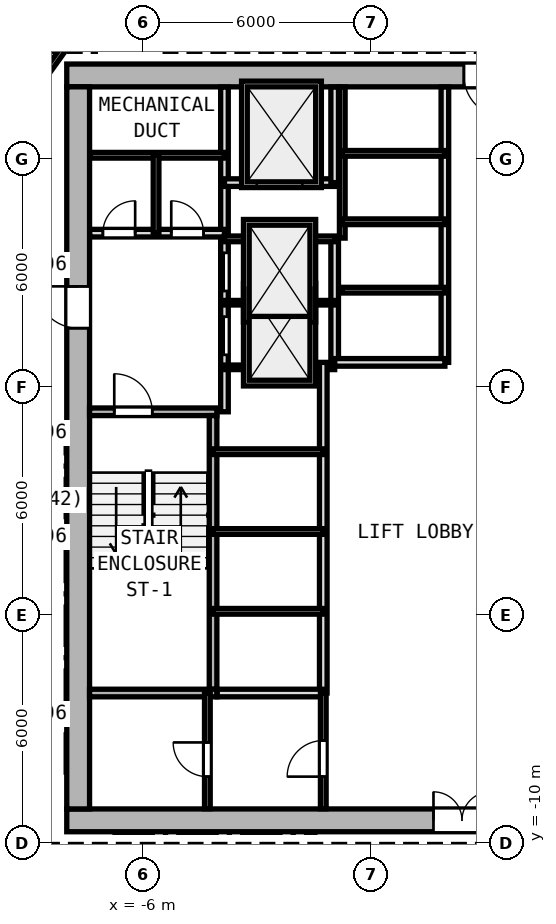
"""IFC4 building model, lengths in metres.
Left out: names, types, materials, properties, quantities, classifications, styles, units other than length and angle.
Written with IfcOpenShell. Run it as: python <this file> out.ifc"""

import sys

from ifc_helpers import new_model, si_unit, direction, frame, frame_2d, origin, origin_2d, place, context, subcontext, project, spatial, rectangle, i_section, extrude, element, fill, save


model = new_model("IFC4")
c1 = context("Model", 3, precision=1e-05, world=origin(), true_north=direction((0.0, 1.0)))
c2 = subcontext(c1, "Body", "Model", "MODEL_VIEW")
j1 = project(units=[si_unit("LENGTHUNIT", "METRE"), si_unit("PLANEANGLEUNIT", "RADIAN")], contexts=[c1])
p1 = place(None, origin())
s1 = spatial("IfcSite", under=j1, at=p1, CompositionType="ELEMENT")
p2 = place(p1, origin())
s2 = spatial("IfcBuilding", under=s1, at=p2, CompositionType="ELEMENT")
p3 = place(p2, frame((0.0, 0.0, 26.4)))
s3 = spatial("IfcBuildingStorey", under=s2, at=p3, CompositionType="ELEMENT", Elevation=26.4)
for number, where, z_axis, x_axis in (
    (1, (-7.7, -9.4, 0.0), (0.0, 0.0, 1.0), (1.0, 0.0, 0.0)),
    (2, (-7.7, 10.2, 0.0), (0.0, 0.0, 1.0), (1.0, 0.0, 0.0)),
    (3, (0.0, -9.4, 0.0), (0.0, 0.0, 1.0), (1.0, 0.0, 0.0)),
    (4, (-7.7, 2.0, 0.0), (0.0, 0.0, 1.0), (1.0, 0.0, 0.0)),
):
    element("IfcColumn", number, at=place(p3, frame(where, z_axis=z_axis, x_axis=x_axis)), inside=s3, PredefinedType="COLUMN", context=c2, shape_type="SweptSolid", body=[
        extrude(i_section(OverallWidth=0.416, OverallDepth=0.446, WebThickness=0.025, FlangeThickness=0.04, FilletRadius=0.015, at=origin_2d()), origin(), (0.0, 0.0, 1.0), 3.6),
    ])
p4 = place(p3, frame((-8.0, -9.4, 0.0), z_axis=(0.0, 0.0, 1.0), x_axis=(1.0, 0.0, 0.0)))
e5 = element("IfcWall", 5, at=p4, inside=s3, PredefinedType="SHEAR", context=c2, shape_type="SweptSolid", body=[
    extrude(rectangle(XDim=16.0, YDim=0.6, at=frame_2d((8.0, 0.0))), origin(), (0.0, 0.0, 1.0), 3.35),
])
p5 = place(p4, frame((9.65, 0.0, 0.0)))
e6 = element("IfcOpeningElement", 6, at=p5, cuts=e5, PredefinedType="OPENING", context=c2, shape_type="SweptSolid", body=[
    extrude(rectangle(XDim=1.5, YDim=2.2, at=frame_2d((0.75, 1.1))), frame((0.0, 0.31, 0.0), z_axis=(0.0, -1.0, 0.0), x_axis=(1.0, 0.0, 0.0)), (0.0, 0.0, 1.0), 0.62),
])
p6 = place(p3, frame((8.0, 10.2, 0.0), z_axis=(0.0, 0.0, 1.0), x_axis=(-1.0, 0.0, 0.0)))
e7 = element("IfcWall", 7, at=p6, inside=s3, PredefinedType="SHEAR", context=c2, shape_type="SweptSolid", body=[
    extrude(rectangle(XDim=16.0, YDim=0.6, at=frame_2d((8.0, 0.0))), origin(), (0.0, 0.0, 1.0), 3.35),
])
p7 = place(p6, frame((4.45, 0.0, 0.0)))
e8 = element("IfcOpeningElement", 8, at=p7, cuts=e7, PredefinedType="OPENING", context=c2, shape_type="SweptSolid", body=[
    extrude(rectangle(XDim=1.1, YDim=2.15, at=frame_2d((0.55, 1.075))), frame((0.0, 0.31, 0.0), z_axis=(0.0, -1.0, 0.0), x_axis=(1.0, 0.0, 0.0)), (0.0, 0.0, 1.0), 0.62),
])
p8 = place(p3, frame((-7.7, -9.1, 0.0), z_axis=(0.0, 0.0, 1.0), x_axis=(0.0, 1.0, 0.0)))
e9 = element("IfcWall", 9, at=p8, inside=s3, PredefinedType="SHEAR", context=c2, shape_type="SweptSolid", body=[
    extrude(rectangle(XDim=19.0, YDim=0.6, at=frame_2d((9.5, 0.0))), origin(), (0.0, 0.0, 1.0), 3.35),
])
p9 = place(p8, frame((12.65, 0.0, 0.0)))
e10 = element("IfcOpeningElement", 10, at=p9, cuts=e9, PredefinedType="OPENING", context=c2, shape_type="SweptSolid", body=[
    extrude(rectangle(XDim=1.1, YDim=2.15, at=frame_2d((0.55, 1.075))), frame((0.0, 0.31, 0.0), z_axis=(0.0, -1.0, 0.0), x_axis=(1.0, 0.0, 0.0)), (0.0, 0.0, 1.0), 0.62),
])
p10 = place(p3, frame((-7.4, 1.35, 0.0), z_axis=(0.0, 0.0, 1.0), x_axis=(1.0, 0.0, 0.0)))
e11 = element("IfcWall", 11, at=p10, inside=s3, PredefinedType="SOLIDWALL", context=c2, shape_type="SweptSolid", body=[
    extrude(rectangle(XDim=3.35, YDim=0.2, at=frame_2d((1.675, 0.0))), origin(), (0.0, 0.0, 1.0), 3.35),
])
p11 = place(p10, frame((0.65, 0.0, 0.0)))
e12 = element("IfcOpeningElement", 12, at=p11, cuts=e11, PredefinedType="OPENING", context=c2, shape_type="SweptSolid", body=[
    extrude(rectangle(XDim=1.0, YDim=2.15, at=frame_2d((0.5, 1.075))), frame((0.0, 0.11, 0.0), z_axis=(0.0, -1.0, 0.0), x_axis=(1.0, 0.0, 0.0)), (0.0, 0.0, 1.0), 0.22),
])
p12 = place(p3, frame((-4.15, -5.95, 0.0), z_axis=(0.0, 0.0, 1.0), x_axis=(0.0, 1.0, 0.0)))
e13 = element("IfcWall", 13, at=p12, inside=s3, PredefinedType="SOLIDWALL", context=c2, shape_type="SweptSolid", body=[
    extrude(rectangle(XDim=7.2, YDim=0.2, at=frame_2d((3.6, 0.0))), origin(), (0.0, 0.0, 1.0), 3.35),
])
p13 = place(p3, frame((-3.85, 1.35, 0.0), z_axis=(0.0, 0.0, 1.0), x_axis=(0.0, 1.0, 0.0)))
e14 = element("IfcWall", 14, at=p13, inside=s3, PredefinedType="SOLIDWALL", context=c2, shape_type="SweptSolid", body=[
    extrude(rectangle(XDim=8.545, YDim=0.2, at=frame_2d((4.272, 0.0))), origin(), (0.0, 0.0, 1.0), 3.35),
])
p14 = place(p13, frame((1.5, 0.0, 0.0)))
e15 = element("IfcOpeningElement", 15, at=p14, cuts=e14, PredefinedType="OPENING", context=c2, shape_type="SweptSolid", body=[
    extrude(rectangle(XDim=1.0, YDim=2.15, at=frame_2d((0.5, 1.075))), frame((0.0, 0.11, 0.0), z_axis=(0.0, -1.0, 0.0), x_axis=(1.0, 0.0, 0.0)), (0.0, 0.0, 1.0), 0.22),
])
p15 = place(p13, frame((3.18, 0.0, 0.0)))
e16 = element("IfcOpeningElement", 16, at=p15, cuts=e14, PredefinedType="OPENING", context=c2, shape_type="SweptSolid", body=[
    extrude(rectangle(XDim=1.0, YDim=2.15, at=frame_2d((0.5, 1.075))), frame((0.0, 0.11, 0.0), z_axis=(0.0, -1.0, 0.0), x_axis=(1.0, 0.0, 0.0)), (0.0, 0.0, 1.0), 0.22),
])
p16 = place(p3, frame((-7.395, 6.05, 0.0), z_axis=(0.0, 0.0, 1.0), x_axis=(1.0, 0.0, 0.0)))
e17 = element("IfcWall", 17, at=p16, inside=s3, PredefinedType="SOLIDWALL", context=c2, shape_type="SweptSolid", body=[
    extrude(rectangle(XDim=3.545, YDim=0.2, at=frame_2d((1.772, 0.0))), origin(), (0.0, 0.0, 1.0), 3.35),
])
p17 = place(p16, frame((0.345, 0.0, 0.0)))
e18 = element("IfcOpeningElement", 18, at=p17, cuts=e17, PredefinedType="OPENING", context=c2, shape_type="SweptSolid", body=[
    extrude(rectangle(XDim=0.85, YDim=2.1, at=frame_2d((0.425, 1.05))), frame((0.0, 0.11, 0.0), z_axis=(0.0, -1.0, 0.0), x_axis=(1.0, 0.0, 0.0)), (0.0, 0.0, 1.0), 0.22),
])
p18 = place(p16, frame((2.145, 0.0, 0.0)))
e19 = element("IfcOpeningElement", 19, at=p18, cuts=e17, PredefinedType="OPENING", context=c2, shape_type="SweptSolid", body=[
    extrude(rectangle(XDim=0.85, YDim=2.1, at=frame_2d((0.425, 1.05))), frame((0.0, 0.11, 0.0), z_axis=(0.0, -1.0, 0.0), x_axis=(1.0, 0.0, 0.0)), (0.0, 0.0, 1.0), 0.22),
])
p19 = place(p3, frame((-7.395, 8.1, 0.0), z_axis=(0.0, 0.0, 1.0), x_axis=(1.0, 0.0, 0.0)))
e20 = element("IfcWall", 20, at=p19, inside=s3, PredefinedType="PARTITIONING", context=c2, shape_type="SweptSolid", body=[
    extrude(rectangle(XDim=3.545, YDim=0.15, at=frame_2d((1.772, 0.0))), origin(), (0.0, 0.0, 1.0), 3.35),
])
p20 = place(p3, frame((-5.65, 6.05, 0.0), z_axis=(0.0, 0.0, 1.0), x_axis=(0.0, 1.0, 0.0)))
e21 = element("IfcWall", 21, at=p20, inside=s3, PredefinedType="PARTITIONING", context=c2, shape_type="SweptSolid", body=[
    extrude(rectangle(XDim=2.05, YDim=0.15, at=frame_2d((1.025, 0.0))), origin(), (0.0, 0.0, 1.0), 3.35),
])
p21 = place(p3, frame((-0.95, 2.65, 0.0), z_axis=(0.0, 0.0, 1.0), x_axis=(0.0, 1.0, 0.0)))
e22 = element("IfcWall", 22, at=p21, inside=s3, PredefinedType="SOLIDWALL", context=c2, shape_type="SweptSolid", body=[
    extrude(rectangle(XDim=3.27, YDim=0.2, at=frame_2d((1.635, 0.0))), origin(), (0.0, 0.0, 1.0), 3.35),
])
for number, where, z_axis, x_axis in (
    (23, (-3.85, 2.52, 0.0), (0.0, 0.0, 1.0), (1.0, 0.0, 0.0)),
    (24, (-3.85, 4.22, 0.0), (0.0, 0.0, 1.0), (1.0, 0.0, 0.0)),
):
    element("IfcWall", number, at=place(p3, frame(where, z_axis=z_axis, x_axis=x_axis)), inside=s3, PredefinedType="PARTITIONING", context=c2, shape_type="SweptSolid", body=[
        extrude(rectangle(XDim=2.9, YDim=0.12, at=frame_2d((1.45, 0.0))), origin(), (0.0, 0.0, 1.0), 3.35),
    ])
p22 = place(p3, frame((-3.85, 5.9, 0.0), z_axis=(0.0, 0.0, 1.0), x_axis=(1.0, 0.0, 0.0)))
e25 = element("IfcWall", 25, at=p22, inside=s3, PredefinedType="PARTITIONING", context=c2, shape_type="SweptSolid", body=[
    extrude(rectangle(XDim=2.9, YDim=0.15, at=frame_2d((1.45, 0.0))), origin(), (0.0, 0.0, 1.0), 3.35),
])
p23 = place(p3, frame((-3.85, 7.38, 0.0), z_axis=(0.0, 0.0, 1.0), x_axis=(1.0, 0.0, 0.0)))
e26 = element("IfcWall", 26, at=p23, inside=s3, PredefinedType="SOLIDWALL", context=c2, shape_type="SweptSolid", body=[
    extrude(rectangle(XDim=2.9, YDim=0.2, at=frame_2d((1.45, 0.0))), origin(), (0.0, 0.0, 1.0), 3.35),
])
p24 = place(p23, frame((0.85, 0.0, 0.0)))
e27 = element("IfcOpeningElement", 27, at=p24, cuts=e26, PredefinedType="OPENING", context=c2, shape_type="SweptSolid", body=[
    extrude(rectangle(XDim=1.2, YDim=2.2, at=frame_2d((0.6, 1.1))), frame((0.0, 0.11, 0.0), z_axis=(0.0, -1.0, 0.0), x_axis=(1.0, 0.0, 0.0)), (0.0, 0.0, 1.0), 0.22),
])
p25 = place(p3, frame((-0.95, 7.38, 0.0), z_axis=(0.0, 0.0, 1.0), x_axis=(0.0, 1.0, 0.0)))
e28 = element("IfcWall", 28, at=p25, inside=s3, PredefinedType="SOLIDWALL", context=c2, shape_type="SweptSolid", body=[
    extrude(rectangle(XDim=2.515, YDim=0.2, at=frame_2d((1.258, 0.0))), origin(), (0.0, 0.0, 1.0), 3.35),
])
p26 = place(p3, frame((-1.25, -6.05, 0.0), z_axis=(0.0, 0.0, 1.0), x_axis=(0.0, 1.0, 0.0)))
e29 = element("IfcWall", 29, at=p26, inside=s3, PredefinedType="SOLIDWALL", context=c2, shape_type="SweptSolid", body=[
    extrude(rectangle(XDim=8.7, YDim=0.2, at=frame_2d((4.35, 0.0))), origin(), (0.0, 0.0, 1.0), 3.35),
])
for number, where, z_axis, x_axis in (
    (30, (-4.15, -3.9, 0.0), (0.0, 0.0, 1.0), (1.0, 0.0, 0.0)),
    (31, (-4.15, -1.8, 0.0), (0.0, 0.0, 1.0), (1.0, 0.0, 0.0)),
    (32, (-4.15, 0.3, 0.0), (0.0, 0.0, 1.0), (1.0, 0.0, 0.0)),
):
    element("IfcWall", number, at=place(p3, frame(where, z_axis=z_axis, x_axis=x_axis)), inside=s3, PredefinedType="PARTITIONING", context=c2, shape_type="SweptSolid", body=[
        extrude(rectangle(XDim=2.9, YDim=0.15, at=frame_2d((1.45, 0.0))), origin(), (0.0, 0.0, 1.0), 3.35),
    ])
p27 = place(p3, frame((1.95, 2.65, 0.0), z_axis=(0.0, 0.0, 1.0), x_axis=(0.0, 1.0, 0.0)))
e33 = element("IfcWall", 33, at=p27, inside=s3, PredefinedType="SOLIDWALL", context=c2, shape_type="SweptSolid", body=[
    extrude(rectangle(XDim=7.245, YDim=0.2, at=frame_2d((3.623, 0.0))), origin(), (0.0, 0.0, 1.0), 3.35),
])
p28 = place(p3, frame((-0.95, 2.65, 0.0), z_axis=(0.0, 0.0, 1.0), x_axis=(1.0, 0.0, 0.0)))
e34 = element("IfcWall", 34, at=p28, inside=s3, PredefinedType="SOLIDWALL", context=c2, shape_type="SweptSolid", body=[
    extrude(rectangle(XDim=2.9, YDim=0.2, at=frame_2d((1.45, 0.0))), origin(), (0.0, 0.0, 1.0), 3.35),
])
p29 = place(p3, frame((-0.75, 5.92, 0.0), z_axis=(0.0, 0.0, 1.0), x_axis=(0.0, 1.0, 0.0)))
e35 = element("IfcWall", 35, at=p29, inside=s3, PredefinedType="PARTITIONING", context=c2, shape_type="SweptSolid", body=[
    extrude(rectangle(XDim=3.975, YDim=0.15, at=frame_2d((1.988, 0.0))), origin(), (0.0, 0.0, 1.0), 3.35),
])
for number, where, z_axis, x_axis in (
    (36, (-0.75, 4.55, 0.0), (0.0, 0.0, 1.0), (1.0, 0.0, 0.0)),
    (37, (-0.75, 6.35, 0.0), (0.0, 0.0, 1.0), (1.0, 0.0, 0.0)),
    (38, (-0.75, 8.15, 0.0), (0.0, 0.0, 1.0), (1.0, 0.0, 0.0)),
):
    element("IfcWall", number, at=place(p3, frame(where, z_axis=z_axis, x_axis=x_axis)), inside=s3, PredefinedType="PARTITIONING", context=c2, shape_type="SweptSolid", body=[
        extrude(rectangle(XDim=2.7, YDim=0.15, at=frame_2d((1.35, 0.0))), origin(), (0.0, 0.0, 1.0), 3.35),
    ])
p30 = place(p3, frame((-7.4, -6.05, 0.0), z_axis=(0.0, 0.0, 1.0), x_axis=(1.0, 0.0, 0.0)))
e39 = element("IfcWall", 39, at=p30, inside=s3, PredefinedType="SOLIDWALL", context=c2, shape_type="SweptSolid", body=[
    extrude(rectangle(XDim=3.35, YDim=0.2, at=frame_2d((1.675, 0.0))), origin(), (0.0, 0.0, 1.0), 3.35),
])
p31 = place(p3, frame((-4.04, -6.05, 0.0), z_axis=(0.0, 0.0, 1.0), x_axis=(1.0, 0.0, 0.0)))
e40 = element("IfcWall", 40, at=p31, inside=s3, PredefinedType="SOLIDWALL", context=c2, shape_type="SweptSolid", body=[
    extrude(rectangle(XDim=2.79, YDim=0.2, at=frame_2d((1.395, 0.0))), origin(), (0.0, 0.0, 1.0), 3.35),
])
p32 = place(p3, frame((-1.25, -9.095, 0.0), z_axis=(0.0, 0.0, 1.0), x_axis=(0.0, 1.0, 0.0)))
e41 = element("IfcWall", 41, at=p32, inside=s3, PredefinedType="PARTITIONING", context=c2, shape_type="SweptSolid", body=[
    extrude(rectangle(XDim=3.045, YDim=0.15, at=frame_2d((1.522, 0.0))), origin(), (0.0, 0.0, 1.0), 3.35),
])
p33 = place(p32, frame((0.845, 0.0, 0.0)))
e42 = element("IfcOpeningElement", 42, at=p33, cuts=e41, PredefinedType="OPENING", context=c2, shape_type="SweptSolid", body=[
    extrude(rectangle(XDim=0.95, YDim=2.1, at=frame_2d((0.475, 1.05))), frame((0.0, 0.085, 0.0), z_axis=(0.0, -1.0, 0.0), x_axis=(1.0, 0.0, 0.0)), (0.0, 0.0, 1.0), 0.17),
])
p34 = place(p3, frame((-4.3, -9.095, 0.0), z_axis=(0.0, 0.0, 1.0), x_axis=(0.0, 1.0, 0.0)))
e43 = element("IfcWall", 43, at=p34, inside=s3, PredefinedType="PARTITIONING", context=c2, shape_type="SweptSolid", body=[
    extrude(rectangle(XDim=3.045, YDim=0.15, at=frame_2d((1.522, 0.0))), origin(), (0.0, 0.0, 1.0), 3.35),
])
p35 = place(p34, frame((0.845, 0.0, 0.0)))
e44 = element("IfcOpeningElement", 44, at=p35, cuts=e43, PredefinedType="OPENING", context=c2, shape_type="SweptSolid", body=[
    extrude(rectangle(XDim=0.9, YDim=2.1, at=frame_2d((0.45, 1.05))), frame((0.0, 0.085, 0.0), z_axis=(0.0, -1.0, 0.0), x_axis=(1.0, 0.0, 0.0)), (0.0, 0.0, 1.0), 0.17),
])
p36 = place(p3, frame((-9.86, 8.426, 0.0), z_axis=(0.0, 0.0, 1.0), x_axis=(0.582449511476, 0.812866881218, 0.0)))
e45 = element("IfcWall", 45, at=p36, inside=s3, PredefinedType="PARTITIONING", context=c2, shape_type="SweptSolid", body=[
    extrude(rectangle(XDim=4.84, YDim=0.15, at=frame_2d((2.42, 0.0))), origin(), (0.0, 0.0, 1.0), 2.725),
])
p37 = place(p36, frame((3.035, 0.0, 0.0)))
e46 = element("IfcOpeningElement", 46, at=p37, cuts=e45, PredefinedType="OPENING", context=c2, shape_type="SweptSolid", body=[
    extrude(rectangle(XDim=0.9, YDim=2.1, at=frame_2d((0.45, 1.05))), frame((0.0, 0.085, 0.0), z_axis=(0.0, -1.0, 0.0), x_axis=(1.0, 0.0, 0.0)), (0.0, 0.0, 1.0), 0.17),
])
p38 = place(p5, origin())
e47 = element("IfcDoor", 47, at=p38, inside=s3, OperationType="DOUBLE_DOOR_SINGLE_SWING", PredefinedType="DOOR", context=c2, shape_type="SweptSolid", body=[
    extrude(rectangle(XDim=1.5, YDim=2.2, at=frame_2d((0.75, 1.1))), frame((0.0, 0.025, 0.0), z_axis=(0.0, -1.0, 0.0), x_axis=(1.0, 0.0, 0.0)), (0.0, 0.0, 1.0), 0.05),
])
fill(e6, e47)
p39 = place(p9, origin())
e48 = element("IfcDoor", 48, at=p39, inside=s3, OperationType="SINGLE_SWING_RIGHT", PredefinedType="DOOR", context=c2, shape_type="SweptSolid", body=[
    extrude(rectangle(XDim=1.1, YDim=2.15, at=frame_2d((0.55, 1.075))), frame((0.0, 0.025, 0.0), z_axis=(0.0, -1.0, 0.0), x_axis=(1.0, 0.0, 0.0)), (0.0, 0.0, 1.0), 0.05),
])
fill(e10, e48)
p40 = place(p7, origin())
e49 = element("IfcDoor", 49, at=p40, inside=s3, OperationType="SINGLE_SWING_LEFT", PredefinedType="DOOR", context=c2, shape_type="SweptSolid", body=[
    extrude(rectangle(XDim=1.1, YDim=2.15, at=frame_2d((0.55, 1.075))), frame((0.0, 0.025, 0.0), z_axis=(0.0, -1.0, 0.0), x_axis=(1.0, 0.0, 0.0)), (0.0, 0.0, 1.0), 0.05),
])
fill(e8, e49)
p41 = place(p11, origin())
e50 = element("IfcDoor", 50, at=p41, inside=s3, OperationType="SINGLE_SWING_LEFT", PredefinedType="DOOR", context=c2, shape_type="SweptSolid", body=[
    extrude(rectangle(XDim=1.0, YDim=2.15, at=frame_2d((0.5, 1.075))), frame((0.0, 0.025, 0.0), z_axis=(0.0, -1.0, 0.0), x_axis=(1.0, 0.0, 0.0)), (0.0, 0.0, 1.0), 0.05),
])
fill(e12, e50)
p42 = place(p17, origin())
e51 = element("IfcDoor", 51, at=p42, inside=s3, OperationType="SINGLE_SWING_RIGHT", PredefinedType="DOOR", context=c2, shape_type="SweptSolid", body=[
    extrude(rectangle(XDim=0.85, YDim=2.1, at=frame_2d((0.425, 1.05))), frame((0.0, 0.025, 0.0), z_axis=(0.0, -1.0, 0.0), x_axis=(1.0, 0.0, 0.0)), (0.0, 0.0, 1.0), 0.05),
])
fill(e18, e51)
p43 = place(p18, origin())
e52 = element("IfcDoor", 52, at=p43, inside=s3, OperationType="SINGLE_SWING_LEFT", PredefinedType="DOOR", context=c2, shape_type="SweptSolid", body=[
    extrude(rectangle(XDim=0.85, YDim=2.1, at=frame_2d((0.425, 1.05))), frame((0.0, 0.025, 0.0), z_axis=(0.0, -1.0, 0.0), x_axis=(1.0, 0.0, 0.0)), (0.0, 0.0, 1.0), 0.05),
])
fill(e19, e52)
p44 = place(p24, origin())
e53 = element("IfcDoor", 53, at=p44, inside=s3, OperationType="DOUBLE_DOOR_SLIDING", PredefinedType="DOOR", context=c2, shape_type="SweptSolid", body=[
    extrude(rectangle(XDim=1.2, YDim=2.2, at=frame_2d((0.6, 1.1))), frame((0.0, 0.025, 0.0), z_axis=(0.0, -1.0, 0.0), x_axis=(1.0, 0.0, 0.0)), (0.0, 0.0, 1.0), 0.05),
])
fill(e27, e53)
p45 = place(p14, origin())
e54 = element("IfcDoor", 54, at=p45, inside=s3, OperationType="DOUBLE_DOOR_SLIDING", PredefinedType="DOOR", context=c2, shape_type="SweptSolid", body=[
    extrude(rectangle(XDim=1.0, YDim=2.15, at=frame_2d((0.5, 1.075))), frame((0.0, 0.025, 0.0), z_axis=(0.0, -1.0, 0.0), x_axis=(1.0, 0.0, 0.0)), (0.0, 0.0, 1.0), 0.05),
])
fill(e15, e54)
p46 = place(p15, origin())
e55 = element("IfcDoor", 55, at=p46, inside=s3, OperationType="DOUBLE_DOOR_SLIDING", PredefinedType="DOOR", context=c2, shape_type="SweptSolid", body=[
    extrude(rectangle(XDim=1.0, YDim=2.15, at=frame_2d((0.5, 1.075))), frame((0.0, 0.025, 0.0), z_axis=(0.0, -1.0, 0.0), x_axis=(1.0, 0.0, 0.0)), (0.0, 0.0, 1.0), 0.05),
])
fill(e16, e55)
p47 = place(p33, origin())
e56 = element("IfcDoor", 56, at=p47, inside=s3, OperationType="SINGLE_SWING_LEFT", PredefinedType="DOOR", context=c2, shape_type="SweptSolid", body=[
    extrude(rectangle(XDim=0.95, YDim=2.1, at=frame_2d((0.475, 1.05))), frame((0.0, 0.025, 0.0), z_axis=(0.0, -1.0, 0.0), x_axis=(1.0, 0.0, 0.0)), (0.0, 0.0, 1.0), 0.05),
])
fill(e42, e56)
p48 = place(p35, origin())
e57 = element("IfcDoor", 57, at=p48, inside=s3, OperationType="SINGLE_SWING_RIGHT", PredefinedType="DOOR", context=c2, shape_type="SweptSolid", body=[
    extrude(rectangle(XDim=0.9, YDim=2.1, at=frame_2d((0.45, 1.05))), frame((0.0, 0.025, 0.0), z_axis=(0.0, -1.0, 0.0), x_axis=(1.0, 0.0, 0.0)), (0.0, 0.0, 1.0), 0.05),
])
fill(e44, e57)
save(model, sys.argv[1])
